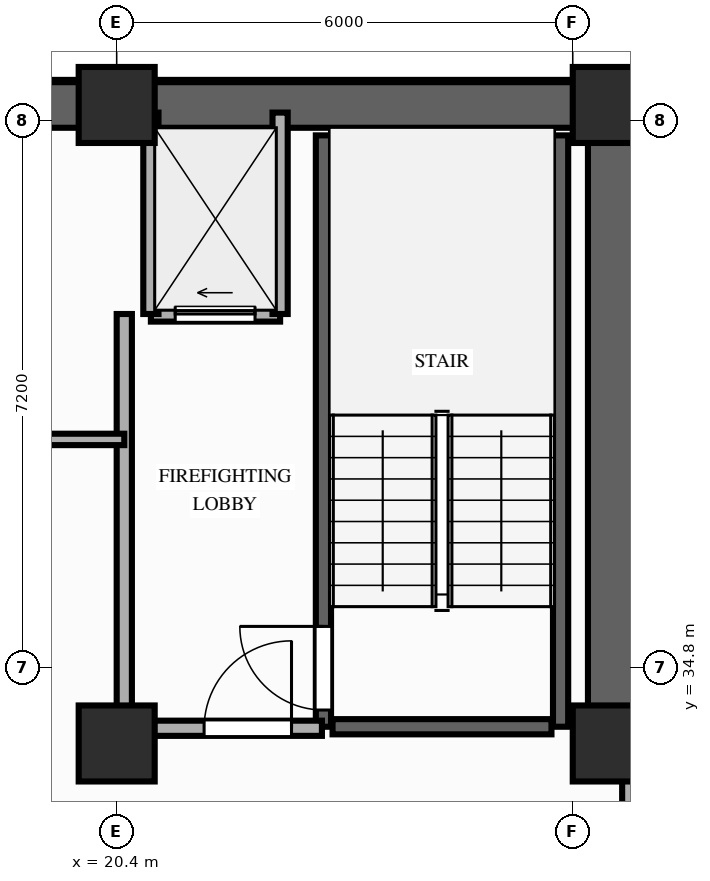
"""IFC4 building model, lengths in metres.
Left out: names, types, materials, properties, quantities, classifications, styles, units other than length and angle.
Written with IfcOpenShell. Run it as: python <this file> out.ifc"""

import sys

from ifc_helpers import new_model, si_unit, direction, frame, frame_2d, origin, origin_2d, place, context, subcontext, project, spatial, rectangle, extrude, element, fill, save


model = new_model("IFC4")
c1 = context("Model", 3, precision=1e-05, world=origin(), true_north=direction((0.0, 1.0)))
c2 = subcontext(c1, "Body", "Model", "MODEL_VIEW")
j1 = project(units=[si_unit("LENGTHUNIT", "METRE"), si_unit("PLANEANGLEUNIT", "RADIAN")], contexts=[c1])
p1 = place(None, origin())
s1 = spatial("IfcSite", under=j1, at=p1, CompositionType="ELEMENT")
p2 = place(p1, origin())
s2 = spatial("IfcBuilding", under=s1, at=p2, CompositionType="ELEMENT")
p3 = place(p2, frame((0.0, 0.0, 139.4)))
s3 = spatial("IfcBuildingStorey", under=s2, at=p3, CompositionType="ELEMENT", Elevation=139.4)
for number, where, z_axis, x_axis in (
    (1, (20.4, 33.8, 0.0), (0.0, 0.0, 1.0), (1.0, 0.0, 0.0)),
    (2, (26.9, 33.8, 0.0), (0.0, 0.0, 1.0), (1.0, 0.0, 0.0)),
    (3, (20.4, 42.2, 0.0), (0.0, 0.0, 1.0), (1.0, 0.0, 0.0)),
    (4, (26.9, 42.2, 0.0), (0.0, 0.0, 1.0), (1.0, 0.0, 0.0)),
):
    element("IfcColumn", number, at=place(p3, frame(where, z_axis=z_axis, x_axis=x_axis)), inside=s3, PredefinedType="COLUMN", context=c2, shape_type="SweptSolid", body=[
        extrude(rectangle(XDim=1.0, YDim=1.0, at=origin_2d()), origin(), (0.0, 0.0, 1.0), 3.2),
    ])
p4 = place(p3, frame((6.45, 42.2, 0.0), z_axis=(0.0, 0.0, 1.0), x_axis=(1.0, 0.0, 0.0)))
e5 = element("IfcWall", 5, at=p4, inside=s3, PredefinedType="SHEAR", context=c2, shape_type="SweptSolid", body=[
    extrude(rectangle(XDim=20.45, YDim=0.6, at=frame_2d((10.225, 0.0))), origin(), (0.0, 0.0, 1.0), 3.02),
])
p5 = place(p3, frame((26.9, 33.8, 0.0), z_axis=(0.0, 0.0, 1.0), x_axis=(0.0, 1.0, 0.0)))
e6 = element("IfcWall", 6, at=p5, inside=s3, PredefinedType="SHEAR", context=c2, shape_type="SweptSolid", body=[
    extrude(rectangle(XDim=7.95, YDim=0.6, at=frame_2d((3.975, 0.0))), origin(), (0.0, 0.0, 1.0), 3.02),
])
p6 = place(p3, frame((23.12, 34.02, 0.0), z_axis=(0.0, 0.0, 1.0), x_axis=(0.0, 1.0, 0.0)))
e7 = element("IfcWall", 7, at=p6, inside=s3, PredefinedType="SHEAR", context=c2, shape_type="SweptSolid", body=[
    extrude(rectangle(XDim=7.78, YDim=0.2, at=frame_2d((3.89, 0.0))), origin(), (0.0, 0.0, 1.0), 3.02),
])
p7 = place(p6, frame((0.22, 0.0, 0.0)))
e8 = element("IfcOpeningElement", 8, at=p7, cuts=e7, PredefinedType="OPENING", context=c2, shape_type="SweptSolid", body=[
    extrude(rectangle(XDim=1.1, YDim=2.15, at=frame_2d((0.55, 1.075))), frame((0.0, 0.11, 0.0), z_axis=(0.0, -1.0, 0.0), x_axis=(1.0, 0.0, 0.0)), (0.0, 0.0, 1.0), 0.22),
])
p8 = place(p3, frame((26.24, 34.02, 0.0), z_axis=(0.0, 0.0, 1.0), x_axis=(0.0, 1.0, 0.0)))
e9 = element("IfcWall", 9, at=p8, inside=s3, PredefinedType="SHEAR", context=c2, shape_type="SweptSolid", body=[
    extrude(rectangle(XDim=7.78, YDim=0.2, at=frame_2d((3.89, 0.0))), origin(), (0.0, 0.0, 1.0), 3.02),
])
p9 = place(p3, frame((23.24, 34.02, 0.0), z_axis=(0.0, 0.0, 1.0), x_axis=(1.0, 0.0, 0.0)))
e10 = element("IfcWall", 10, at=p9, inside=s3, PredefinedType="SHEAR", context=c2, shape_type="SweptSolid", body=[
    extrude(rectangle(XDim=2.88, YDim=0.2, at=frame_2d((1.44, 0.0))), origin(), (0.0, 0.0, 1.0), 3.02),
])
p10 = place(p3, frame((20.85, 39.45, 0.0), z_axis=(0.0, 0.0, 1.0), x_axis=(1.0, 0.0, 0.0)))
e11 = element("IfcWall", 11, at=p10, inside=s3, PredefinedType="MOVABLE", context=c2, shape_type="SweptSolid", body=[
    extrude(rectangle(XDim=1.7, YDim=0.2, at=frame_2d((0.85, 0.0))), origin(), (0.0, 0.0, 1.0), 3.02),
])
p11 = place(p10, frame((0.32, 0.0, 0.0)))
e12 = element("IfcOpeningElement", 12, at=p11, cuts=e11, PredefinedType="OPENING", context=c2, shape_type="SweptSolid", body=[
    extrude(rectangle(XDim=1.05, YDim=2.15, at=frame_2d((0.525, 1.075))), frame((0.0, 0.11, 0.0), z_axis=(0.0, -1.0, 0.0), x_axis=(1.0, 0.0, 0.0)), (0.0, 0.0, 1.0), 0.22),
])
for number, where, z_axis, x_axis in (
    (13, (20.85, 39.45, 0.0), (0.0, 0.0, 1.0), (0.0, 1.0, 0.0)),
    (14, (22.55, 39.45, 0.0), (0.0, 0.0, 1.0), (0.0, 1.0, 0.0)),
):
    element("IfcWall", number, at=place(p3, frame(where, z_axis=z_axis, x_axis=x_axis)), inside=s3, PredefinedType="MOVABLE", context=c2, shape_type="SweptSolid", body=[
        extrude(rectangle(XDim=2.65, YDim=0.2, at=frame_2d((1.325, 0.0))), origin(), (0.0, 0.0, 1.0), 2.45),
    ])
p12 = place(p3, frame((20.5, 34.0, 0.0), z_axis=(0.0, 0.0, 1.0), x_axis=(0.0, 1.0, 0.0)))
e15 = element("IfcWall", 15, at=p12, inside=s3, PredefinedType="PARTITIONING", context=c2, shape_type="SweptSolid", body=[
    extrude(rectangle(XDim=5.45, YDim=0.2, at=frame_2d((2.725, 0.0))), origin(), (0.0, 0.0, 1.0), 2.45),
])
p13 = place(p3, frame((20.5, 34.0, 0.0), z_axis=(0.0, 0.0, 1.0), x_axis=(1.0, 0.0, 0.0)))
e16 = element("IfcWall", 16, at=p13, inside=s3, PredefinedType="PARTITIONING", context=c2, shape_type="SweptSolid", body=[
    extrude(rectangle(XDim=2.6, YDim=0.2, at=frame_2d((1.3, 0.0))), origin(), (0.0, 0.0, 1.0), 2.45),
])
p14 = place(p13, frame((1.05, 0.0, 0.0)))
e17 = element("IfcOpeningElement", 17, at=p14, cuts=e16, PredefinedType="OPENING", context=c2, shape_type="SweptSolid", body=[
    extrude(rectangle(XDim=1.15, YDim=2.15, at=frame_2d((0.575, 1.075))), frame((0.0, 0.11, 0.0), z_axis=(0.0, -1.0, 0.0), x_axis=(1.0, 0.0, 0.0)), (0.0, 0.0, 1.0), 0.22),
])
p15 = place(p3, frame((12.9, 37.8, 0.0), z_axis=(0.0, 0.0, 1.0), x_axis=(1.0, 0.0, 0.0)))
e18 = element("IfcWall", 18, at=p15, inside=s3, PredefinedType="PARTITIONING", context=c2, shape_type="SweptSolid", body=[
    extrude(rectangle(XDim=7.6, YDim=0.15, at=frame_2d((3.8, 0.0))), origin(), (0.0, 0.0, 1.0), 3.02),
])
p16 = place(p15, frame((1.3, 0.0, 0.0)))
e19 = element("IfcOpeningElement", 19, at=p16, cuts=e18, PredefinedType="OPENING", context=c2, shape_type="SweptSolid", body=[
    extrude(rectangle(XDim=0.95, YDim=2.15, at=frame_2d((0.475, 1.075))), frame((0.0, 0.085, 0.0), z_axis=(0.0, -1.0, 0.0), x_axis=(1.0, 0.0, 0.0)), (0.0, 0.0, 1.0), 0.17),
])
p17 = place(p15, frame((5.1, 0.0, 0.0)))
e20 = element("IfcOpeningElement", 20, at=p17, cuts=e18, PredefinedType="OPENING", context=c2, shape_type="SweptSolid", body=[
    extrude(rectangle(XDim=0.95, YDim=2.15, at=frame_2d((0.475, 1.075))), frame((0.0, 0.085, 0.0), z_axis=(0.0, -1.0, 0.0), x_axis=(1.0, 0.0, 0.0)), (0.0, 0.0, 1.0), 0.17),
])
p18 = place(p3, frame((27.15, 32.0, 0.0), z_axis=(0.0, 0.0, 1.0), x_axis=(0.0, 1.0, 0.0)))
e21 = element("IfcWall", 21, at=p18, inside=s3, PredefinedType="PARTITIONING", context=c2, shape_type="SweptSolid", body=[
    extrude(rectangle(XDim=1.68, YDim=0.2, at=frame_2d((0.84, 0.0))), origin(), (0.0, 0.0, 1.0), 2.45),
])
p19 = place(p7, origin())
e22 = element("IfcDoor", 22, at=p19, inside=s3, OperationType="SINGLE_SWING_RIGHT", PredefinedType="DOOR", context=c2, shape_type="SweptSolid", body=[
    extrude(rectangle(XDim=1.1, YDim=2.15, at=frame_2d((0.55, 1.075))), frame((0.0, 0.025, 0.0), z_axis=(0.0, -1.0, 0.0), x_axis=(1.0, 0.0, 0.0)), (0.0, 0.0, 1.0), 0.05),
])
fill(e8, e22)
p20 = place(p11, origin())
e23 = element("IfcDoor", 23, at=p20, inside=s3, OperationType="SLIDING_TO_LEFT", PredefinedType="DOOR", context=c2, shape_type="SweptSolid", body=[
    extrude(rectangle(XDim=1.05, YDim=2.15, at=frame_2d((0.525, 1.075))), frame((0.0, 0.025, 0.0), z_axis=(0.0, -1.0, 0.0), x_axis=(1.0, 0.0, 0.0)), (0.0, 0.0, 1.0), 0.05),
])
fill(e12, e23)
p21 = place(p14, origin())
e24 = element("IfcDoor", 24, at=p21, inside=s3, OperationType="SINGLE_SWING_RIGHT", PredefinedType="DOOR", context=c2, shape_type="SweptSolid", body=[
    extrude(rectangle(XDim=1.15, YDim=2.15, at=frame_2d((0.575, 1.075))), frame((0.0, 0.025, 0.0), z_axis=(0.0, -1.0, 0.0), x_axis=(1.0, 0.0, 0.0)), (0.0, 0.0, 1.0), 0.05),
])
fill(e17, e24)
save(model, sys.argv[1])
